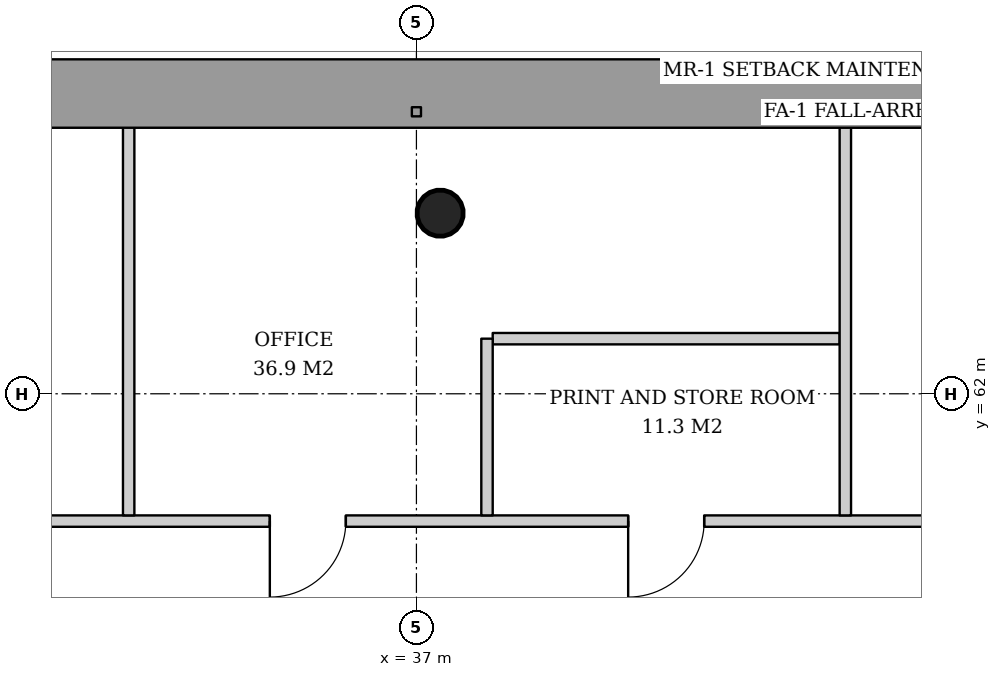
"""IFC4 building model, lengths in metres.
Left out: names, types, materials, properties, quantities, classifications, styles, units other than length and angle.
Written with IfcOpenShell. Run it as: python <this file> out.ifc"""

import sys

from ifc_helpers import new_model, si_unit, direction, frame, frame_2d, origin, origin_2d, place, context, subcontext, project, spatial, rectangle, hollow_circle, extrude, element, fill, save


model = new_model("IFC4")
c1 = context("Model", 3, precision=1e-05, world=origin(), true_north=direction((0.0, 1.0)))
c2 = subcontext(c1, "Body", "Model", "MODEL_VIEW")
j1 = project(units=[si_unit("LENGTHUNIT", "METRE"), si_unit("PLANEANGLEUNIT", "RADIAN")], contexts=[c1])
p1 = place(None, origin())
s1 = spatial("IfcSite", under=j1, at=p1, CompositionType="ELEMENT")
p2 = place(p1, origin())
s2 = spatial("IfcBuilding", under=s1, at=p2, CompositionType="ELEMENT")
p3 = place(p2, frame((0.0, 0.0, 195.8)))
s3 = spatial("IfcBuildingStorey", under=s2, at=p3, CompositionType="ELEMENT", Elevation=195.8)
p4 = place(p3, frame((30.686, 60.314, 0.0), z_axis=(0.031898107953, -0.031898107953, 0.998981992539), x_axis=(0.707106781187, 0.707106781187, 0.0)))
e1 = element("IfcColumn", 1, at=p4, inside=s3, PredefinedType="COLUMN", context=c2, shape_type="SweptSolid", body=[
    extrude(rectangle(XDim=2.0, YDim=2.0, at=origin_2d()), origin(), (0.0, 0.0, 1.0), 3.804),
])
p5 = place(p3, frame((37.293, 64.414, 0.0), z_axis=(0.015923048203, -0.031910302246, 0.999363892257), x_axis=(0.894786976326, 0.446493300058, 0.0)))
e2 = element("IfcColumn", 2, at=p5, inside=s3, PredefinedType="COLUMN", context=c2, shape_type="SweptSolid", body=[
    extrude(hollow_circle(Radius=0.305, WallThickness=0.025, at=origin_2d()), origin(), (0.0, 0.0, 1.0), 3.802),
])
p6 = place(p3, frame((42.568, 62.725, 0.0), z_axis=(0.0, 0.0, 1.0), x_axis=(-1.0, 0.0, 0.0)))
e3 = element("IfcWall", 3, at=p6, inside=s3, PredefinedType="PARTITIONING", context=c2, shape_type="SweptSolid", body=[
    extrude(rectangle(XDim=4.564, YDim=0.15, at=frame_2d((2.282, 0.0))), origin(), (0.0, 0.0, 1.0), 2.867),
])
p7 = place(p3, frame((57.836, 60.325, 0.0), z_axis=(0.0, 0.0, 1.0), x_axis=(-1.0, 0.0, 0.0)))
e4 = element("IfcWall", 4, at=p7, inside=s3, PredefinedType="PARTITIONING", context=c2, shape_type="SweptSolid", body=[
    extrude(rectangle(XDim=25.671, YDim=0.15, at=frame_2d((12.836, 0.0))), origin(), (0.0, 0.0, 1.0), 2.867),
])
p8 = place(p7, frame((2.907, 0.0, 0.0)))
e5 = element("IfcOpeningElement", 5, at=p8, cuts=e4, PredefinedType="OPENING", context=c2, shape_type="SweptSolid", body=[
    extrude(rectangle(XDim=1.0, YDim=2.1, at=frame_2d((0.5, 1.05))), frame((0.0, 0.085, 0.0), z_axis=(0.0, -1.0, 0.0), x_axis=(1.0, 0.0, 0.0)), (0.0, 0.0, 1.0), 0.17),
])
p9 = place(p7, frame((7.622, 0.0, 0.0)))
e6 = element("IfcOpeningElement", 6, at=p9, cuts=e4, PredefinedType="OPENING", context=c2, shape_type="SweptSolid", body=[
    extrude(rectangle(XDim=1.0, YDim=2.1, at=frame_2d((0.5, 1.05))), frame((0.0, 0.085, 0.0), z_axis=(0.0, -1.0, 0.0), x_axis=(1.0, 0.0, 0.0)), (0.0, 0.0, 1.0), 0.17),
])
p10 = place(p7, frame((12.336, 0.0, 0.0)))
e7 = element("IfcOpeningElement", 7, at=p10, cuts=e4, PredefinedType="OPENING", context=c2, shape_type="SweptSolid", body=[
    extrude(rectangle(XDim=1.0, YDim=2.1, at=frame_2d((0.5, 1.05))), frame((0.0, 0.085, 0.0), z_axis=(0.0, -1.0, 0.0), x_axis=(1.0, 0.0, 0.0)), (0.0, 0.0, 1.0), 0.17),
])
p11 = place(p7, frame((17.05, 0.0, 0.0)))
e8 = element("IfcOpeningElement", 8, at=p11, cuts=e4, PredefinedType="OPENING", context=c2, shape_type="SweptSolid", body=[
    extrude(rectangle(XDim=1.0, YDim=2.1, at=frame_2d((0.5, 1.05))), frame((0.0, 0.085, 0.0), z_axis=(0.0, -1.0, 0.0), x_axis=(1.0, 0.0, 0.0)), (0.0, 0.0, 1.0), 0.17),
])
p12 = place(p7, frame((21.764, 0.0, 0.0)))
e9 = element("IfcOpeningElement", 9, at=p12, cuts=e4, PredefinedType="OPENING", context=c2, shape_type="SweptSolid", body=[
    extrude(rectangle(XDim=1.0, YDim=2.1, at=frame_2d((0.5, 1.05))), frame((0.0, 0.085, 0.0), z_axis=(0.0, -1.0, 0.0), x_axis=(1.0, 0.0, 0.0)), (0.0, 0.0, 1.0), 0.17),
])
p13 = place(p3, frame((42.643, 60.4, 0.0), z_axis=(0.0, 0.0, 1.0), x_axis=(0.0, 1.0, 0.0)))
e10 = element("IfcWall", 10, at=p13, inside=s3, PredefinedType="PARTITIONING", context=c2, shape_type="SweptSolid", body=[
    extrude(rectangle(XDim=5.14, YDim=0.15, at=frame_2d((2.57, 0.0))), origin(), (0.0, 0.0, 1.0), 2.867),
])
p14 = place(p3, frame((37.928, 60.4, 0.0), z_axis=(0.0, 0.0, 1.0), x_axis=(0.0, 1.0, 0.0)))
e11 = element("IfcWall", 11, at=p14, inside=s3, PredefinedType="PARTITIONING", context=c2, shape_type="SweptSolid", body=[
    extrude(rectangle(XDim=2.325, YDim=0.15, at=frame_2d((1.163, 0.0))), origin(), (0.0, 0.0, 1.0), 3.62),
])
p15 = place(p3, frame((33.214, 60.4, 0.0), z_axis=(0.0, 0.0, 1.0), x_axis=(0.0, 1.0, 0.0)))
e12 = element("IfcWall", 12, at=p15, inside=s3, PredefinedType="PARTITIONING", context=c2, shape_type="SweptSolid", body=[
    extrude(rectangle(XDim=5.14, YDim=0.15, at=frame_2d((2.57, 0.0))), origin(), (0.0, 0.0, 1.0), 3.12),
])
p16 = place(p11, origin())
e13 = element("IfcDoor", 13, at=p16, inside=s3, OperationType="SINGLE_SWING_RIGHT", PredefinedType="DOOR", context=c2, shape_type="SweptSolid", body=[
    extrude(rectangle(XDim=1.0, YDim=2.1, at=frame_2d((0.5, 1.05))), frame((0.0, 0.025, 0.0), z_axis=(0.0, -1.0, 0.0), x_axis=(1.0, 0.0, 0.0)), (0.0, 0.0, 1.0), 0.05),
])
fill(e8, e13)
p17 = place(p12, origin())
e14 = element("IfcDoor", 14, at=p17, inside=s3, OperationType="SINGLE_SWING_RIGHT", PredefinedType="DOOR", context=c2, shape_type="SweptSolid", body=[
    extrude(rectangle(XDim=1.0, YDim=2.1, at=frame_2d((0.5, 1.05))), frame((0.0, 0.025, 0.0), z_axis=(0.0, -1.0, 0.0), x_axis=(1.0, 0.0, 0.0)), (0.0, 0.0, 1.0), 0.05),
])
fill(e9, e14)
save(model, sys.argv[1])
